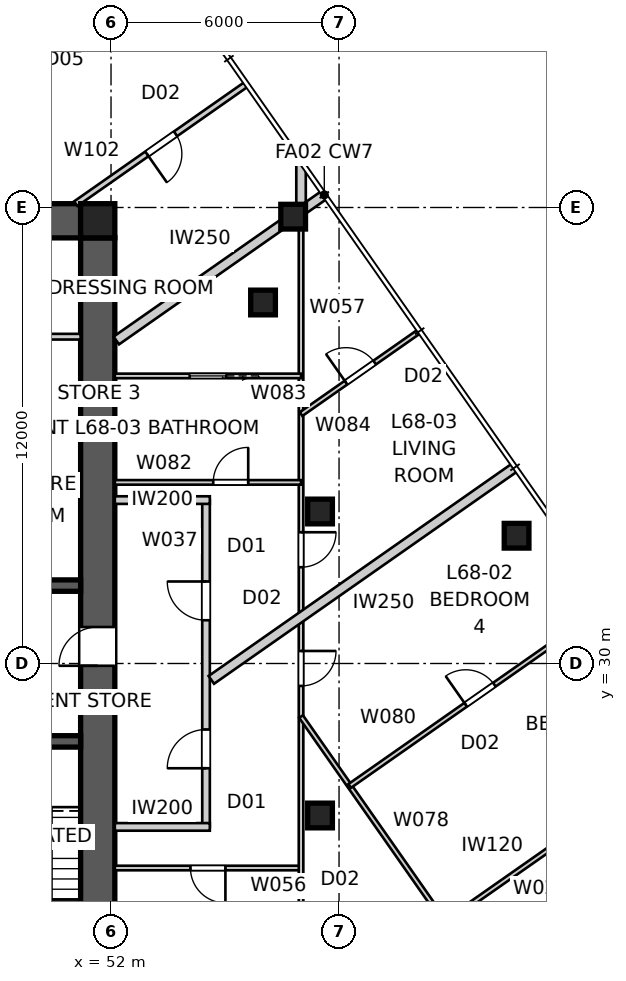
"""IFC4 building model, lengths in metres.
Left out: names, types, materials, properties, quantities, classifications, styles, units other than length and angle.
Written with IfcOpenShell. Run it as: python <this file> out.ifc"""

import sys

from ifc_helpers import new_model, si_unit, direction, frame, frame_2d, origin, origin_2d, place, context, subcontext, project, spatial, polyline, rectangle, outline, extrude, element, fill, save


model = new_model("IFC4")
c1 = context("Model", 3, precision=1e-05, world=origin(), true_north=direction((0.0, 1.0)))
c2 = subcontext(c1, "Body", "Model", "MODEL_VIEW")
j1 = project(units=[si_unit("LENGTHUNIT", "METRE"), si_unit("PLANEANGLEUNIT", "RADIAN")], contexts=[c1])
p1 = place(None, origin())
s1 = spatial("IfcSite", under=j1, at=p1, CompositionType="ELEMENT")
p2 = place(p1, origin())
s2 = spatial("IfcBuilding", under=s1, at=p2, CompositionType="ELEMENT")
p3 = place(p2, frame((0.0, 0.0, 247.2)))
s3 = spatial("IfcBuildingStorey", under=s2, at=p3, CompositionType="ELEMENT", Elevation=247.2)
p4 = place(p3, frame((28.8, 41.65, 0.0), z_axis=(0.0, 0.0, 1.0), x_axis=(1.0, 0.0, 0.0)))
e1 = element("IfcWall", 1, at=p4, inside=s3, PredefinedType="SHEAR", context=c2, shape_type="SweptSolid", body=[
    extrude(outline(polyline([(0.0, -0.45), (22.4, -0.45), (22.4, -0.025), (22.85, -0.025), (22.85, 0.025), (22.4, 0.025), (22.4, 0.45), (0.0, 0.45), (0.0, 0.025), (-0.45, 0.025), (-0.45, -0.025), (0.0, -0.025), (0.0, -0.45)])), origin(), (0.0, 0.0, 1.0), 3.4),
])
p5 = place(p3, frame((51.65, 18.8, 0.0), z_axis=(0.0, 0.0, 1.0), x_axis=(0.0, 1.0, 0.0)))
e2 = element("IfcWall", 2, at=p5, inside=s3, PredefinedType="SHEAR", context=c2, shape_type="SweptSolid", body=[
    extrude(outline(polyline([(0.0, -0.45), (22.4, -0.45), (22.4, -0.025), (22.85, -0.025), (22.85, 0.025), (22.4, 0.025), (22.4, 0.45), (0.0, 0.45), (0.0, 0.025), (-0.45, 0.025), (-0.45, -0.025), (0.0, -0.025), (0.0, -0.45)])), origin(), (0.0, 0.0, 1.0), 3.4),
])
p6 = place(p5, frame((11.14, 0.0, 0.0)))
e3 = element("IfcOpeningElement", 3, at=p6, cuts=e2, PredefinedType="OPENING", context=c2, shape_type="SweptSolid", body=[
    extrude(rectangle(XDim=1.02, YDim=2.4, at=frame_2d((0.51, 1.2))), frame((0.0, 0.46, 0.0), z_axis=(0.0, -1.0, 0.0), x_axis=(1.0, 0.0, 0.0)), (0.0, 0.0, 1.0), 0.92),
])
p7 = place(p3, frame((28.8, 32.05, 0.0), z_axis=(0.0, 0.0, 1.0), x_axis=(1.0, 0.0, 0.0)))
e4 = element("IfcWall", 4, at=p7, inside=s3, PredefinedType="SHEAR", context=c2, shape_type="SweptSolid", body=[
    extrude(rectangle(XDim=22.4, YDim=0.3, at=frame_2d((11.2, 0.0))), origin(), (0.0, 0.0, 1.0), 3.4),
])
p8 = place(p7, frame((19.04, 0.0, 0.0)))
e5 = element("IfcOpeningElement", 5, at=p8, cuts=e4, PredefinedType="OPENING", context=c2, shape_type="SweptSolid", body=[
    extrude(rectangle(XDim=0.92, YDim=2.1, at=frame_2d((0.46, 1.05))), frame((0.0, 0.16, 0.0), z_axis=(0.0, -1.0, 0.0), x_axis=(1.0, 0.0, 0.0)), (0.0, 0.0, 1.0), 0.32),
])
p9 = place(p7, frame((1.265, 0.0, 0.0)))
e6 = element("IfcOpeningElement", 6, at=p9, cuts=e4, PredefinedType="OPENING", context=c2, shape_type="SweptSolid", body=[
    extrude(rectangle(XDim=1.02, YDim=2.1, at=frame_2d((0.51, 1.05))), frame((0.0, 0.16, 0.0), z_axis=(0.0, -1.0, 0.0), x_axis=(1.0, 0.0, 0.0)), (0.0, 0.0, 1.0), 0.32),
])
p10 = place(p7, frame((4.015, 0.0, 0.0)))
e7 = element("IfcOpeningElement", 7, at=p10, cuts=e4, PredefinedType="OPENING", context=c2, shape_type="SweptSolid", body=[
    extrude(rectangle(XDim=0.92, YDim=2.1, at=frame_2d((0.46, 1.05))), frame((0.0, 0.16, 0.0), z_axis=(0.0, -1.0, 0.0), x_axis=(1.0, 0.0, 0.0)), (0.0, 0.0, 1.0), 0.32),
])
p11 = place(p7, frame((7.015, 0.0, 0.0)))
e8 = element("IfcOpeningElement", 8, at=p11, cuts=e4, PredefinedType="OPENING", context=c2, shape_type="SweptSolid", body=[
    extrude(rectangle(XDim=0.92, YDim=2.1, at=frame_2d((0.46, 1.05))), frame((0.0, 0.16, 0.0), z_axis=(0.0, -1.0, 0.0), x_axis=(1.0, 0.0, 0.0)), (0.0, 0.0, 1.0), 0.32),
])
p12 = place(p7, frame((9.34, 0.0, 0.0)))
e9 = element("IfcOpeningElement", 9, at=p12, cuts=e4, PredefinedType="OPENING", context=c2, shape_type="SweptSolid", body=[
    extrude(rectangle(XDim=0.92, YDim=2.1, at=frame_2d((0.46, 1.05))), frame((0.0, 0.16, 0.0), z_axis=(0.0, -1.0, 0.0), x_axis=(1.0, 0.0, 0.0)), (0.0, 0.0, 1.0), 0.32),
])
p13 = place(p7, frame((12.05, 0.0, 0.0)))
e10 = element("IfcOpeningElement", 10, at=p13, cuts=e4, PredefinedType="OPENING", context=c2, shape_type="SweptSolid", body=[
    extrude(rectangle(XDim=1.1, YDim=2.1, at=frame_2d((0.55, 1.05))), frame((0.0, 0.16, 0.0), z_axis=(0.0, -1.0, 0.0), x_axis=(1.0, 0.0, 0.0)), (0.0, 0.0, 1.0), 0.32),
])
p14 = place(p7, frame((14.85, 0.0, 0.0)))
e11 = element("IfcOpeningElement", 11, at=p14, cuts=e4, PredefinedType="OPENING", context=c2, shape_type="SweptSolid", body=[
    extrude(rectangle(XDim=1.1, YDim=2.1, at=frame_2d((0.55, 1.05))), frame((0.0, 0.16, 0.0), z_axis=(0.0, -1.0, 0.0), x_axis=(1.0, 0.0, 0.0)), (0.0, 0.0, 1.0), 0.32),
])
p15 = place(p3, frame((51.2, 27.95, 0.0), z_axis=(0.0, 0.0, 1.0), x_axis=(-1.0, 0.0, 0.0)))
e12 = element("IfcWall", 12, at=p15, inside=s3, PredefinedType="SHEAR", context=c2, shape_type="SweptSolid", body=[
    extrude(rectangle(XDim=22.4, YDim=0.3, at=frame_2d((11.2, 0.0))), origin(), (0.0, 0.0, 1.0), 3.4),
])
p16 = place(p15, frame((19.04, 0.0, 0.0)))
e13 = element("IfcOpeningElement", 13, at=p16, cuts=e12, PredefinedType="OPENING", context=c2, shape_type="SweptSolid", body=[
    extrude(rectangle(XDim=0.92, YDim=2.1, at=frame_2d((0.46, 1.05))), frame((0.0, 0.16, 0.0), z_axis=(0.0, -1.0, 0.0), x_axis=(1.0, 0.0, 0.0)), (0.0, 0.0, 1.0), 0.32),
])
p17 = place(p15, frame((1.265, 0.0, 0.0)))
e14 = element("IfcOpeningElement", 14, at=p17, cuts=e12, PredefinedType="OPENING", context=c2, shape_type="SweptSolid", body=[
    extrude(rectangle(XDim=1.02, YDim=2.1, at=frame_2d((0.51, 1.05))), frame((0.0, 0.16, 0.0), z_axis=(0.0, -1.0, 0.0), x_axis=(1.0, 0.0, 0.0)), (0.0, 0.0, 1.0), 0.32),
])
p18 = place(p15, frame((4.015, 0.0, 0.0)))
e15 = element("IfcOpeningElement", 15, at=p18, cuts=e12, PredefinedType="OPENING", context=c2, shape_type="SweptSolid", body=[
    extrude(rectangle(XDim=0.92, YDim=2.1, at=frame_2d((0.46, 1.05))), frame((0.0, 0.16, 0.0), z_axis=(0.0, -1.0, 0.0), x_axis=(1.0, 0.0, 0.0)), (0.0, 0.0, 1.0), 0.32),
])
p19 = place(p15, frame((9.79, 0.0, 0.0)))
e16 = element("IfcOpeningElement", 16, at=p19, cuts=e12, PredefinedType="OPENING", context=c2, shape_type="SweptSolid", body=[
    extrude(rectangle(XDim=0.92, YDim=2.1, at=frame_2d((0.46, 1.05))), frame((0.0, 0.16, 0.0), z_axis=(0.0, -1.0, 0.0), x_axis=(1.0, 0.0, 0.0)), (0.0, 0.0, 1.0), 0.32),
])
p20 = place(p15, frame((6.115, 0.0, 0.0)))
e17 = element("IfcOpeningElement", 17, at=p20, cuts=e12, PredefinedType="OPENING", context=c2, shape_type="SweptSolid", body=[
    extrude(rectangle(XDim=0.92, YDim=2.1, at=frame_2d((0.46, 1.05))), frame((0.0, 0.16, 0.0), z_axis=(0.0, -1.0, 0.0), x_axis=(1.0, 0.0, 0.0)), (0.0, 0.0, 1.0), 0.32),
])
p21 = place(p15, frame((12.05, 0.0, 0.0)))
e18 = element("IfcOpeningElement", 18, at=p21, cuts=e12, PredefinedType="OPENING", context=c2, shape_type="SweptSolid", body=[
    extrude(rectangle(XDim=1.1, YDim=2.1, at=frame_2d((0.55, 1.05))), frame((0.0, 0.16, 0.0), z_axis=(0.0, -1.0, 0.0), x_axis=(1.0, 0.0, 0.0)), (0.0, 0.0, 1.0), 0.32),
])
p22 = place(p15, frame((14.85, 0.0, 0.0)))
e19 = element("IfcOpeningElement", 19, at=p22, cuts=e12, PredefinedType="OPENING", context=c2, shape_type="SweptSolid", body=[
    extrude(rectangle(XDim=1.1, YDim=2.1, at=frame_2d((0.55, 1.05))), frame((0.0, 0.16, 0.0), z_axis=(0.0, -1.0, 0.0), x_axis=(1.0, 0.0, 0.0)), (0.0, 0.0, 1.0), 0.32),
])
p23 = place(p3, frame((51.65, 41.65, 0.0), z_axis=(0.0, 0.0, 1.0), x_axis=(1.0, 0.0, 0.0)))
e20 = element("IfcColumn", 20, at=p23, inside=s3, PredefinedType="COLUMN", context=c2, shape_type="SweptSolid", body=[
    extrude(rectangle(XDim=0.9, YDim=0.9, at=origin_2d()), origin(), (0.0, 0.0, 1.0), 3.4),
])
for number, where, z_axis, x_axis in (
    (21, (62.672, 33.362, 0.0), (0.0, 0.0, 1.0), (1.0, 0.0, 0.0)),
    (22, (56.793, 41.758, 0.0), (0.0, 0.0, 1.0), (1.0, 0.0, 0.0)),
    (23, (57.5, 26.0, 0.0), (0.0, 0.0, 1.0), (1.0, 0.0, 0.0)),
    (24, (57.5, 34.0, 0.0), (0.0, 0.0, 1.0), (1.0, 0.0, 0.0)),
    (25, (56.0, 39.5, 0.0), (0.0, 0.0, 1.0), (1.0, 0.0, 0.0)),
):
    element("IfcColumn", number, at=place(p3, frame(where, z_axis=z_axis, x_axis=x_axis)), inside=s3, PredefinedType="COLUMN", context=c2, shape_type="SweptSolid", body=[
        extrude(rectangle(XDim=0.65, YDim=0.65, at=origin_2d()), origin(), (0.0, 0.0, 1.0), 3.4),
    ])
p24 = place(p3, frame((54.5, 25.7, 0.0), z_axis=(0.0, 0.0, 1.0), x_axis=(0.0, 1.0, 0.0)))
e26 = element("IfcWall", 26, at=p24, inside=s3, PredefinedType="PARTITIONING", context=c2, shape_type="SweptSolid", body=[
    extrude(rectangle(XDim=8.6, YDim=0.2, at=frame_2d((4.3, 0.0))), origin(), (0.0, 0.0, 1.0), 3.25),
])
p25 = place(p24, frame((5.438, 0.0, 0.0)))
e27 = element("IfcOpeningElement", 27, at=p25, cuts=e26, PredefinedType="OPENING", context=c2, shape_type="SweptSolid", body=[
    extrude(rectangle(XDim=1.02, YDim=2.34, at=frame_2d((0.51, 1.17))), frame((0.0, 0.11, 0.0), z_axis=(0.0, -1.0, 0.0), x_axis=(1.0, 0.0, 0.0)), (0.0, 0.0, 1.0), 0.22),
])
p26 = place(p24, frame((1.543, 0.0, 0.0)))
e28 = element("IfcOpeningElement", 28, at=p26, cuts=e26, PredefinedType="OPENING", context=c2, shape_type="SweptSolid", body=[
    extrude(rectangle(XDim=1.02, YDim=2.34, at=frame_2d((0.51, 1.17))), frame((0.0, 0.11, 0.0), z_axis=(0.0, -1.0, 0.0), x_axis=(1.0, 0.0, 0.0)), (0.0, 0.0, 1.0), 0.22),
])
for number, where, z_axis, x_axis in (
    (29, (52.1, 34.3, 0.0), (0.0, 0.0, 1.0), (1.0, 0.0, 0.0)),
    (30, (52.1, 25.7, 0.0), (0.0, 0.0, 1.0), (1.0, 0.0, 0.0)),
):
    element("IfcWall", number, at=place(p3, frame(where, z_axis=z_axis, x_axis=x_axis)), inside=s3, PredefinedType="PARTITIONING", context=c2, shape_type="SweptSolid", body=[
        extrude(rectangle(XDim=2.5, YDim=0.2, at=frame_2d((1.25, 0.0))), origin(), (0.0, 0.0, 1.0), 3.25),
    ])
p27 = place(p3, frame((57.612, 42.332, 0.0), z_axis=(0.0, 0.0, 1.0), x_axis=(-0.819161528122, -0.573562891796, 0.0)))
e31 = element("IfcWall", 31, at=p27, inside=s3, PredefinedType="PARTITIONING", context=c2, shape_type="SweptSolid", body=[
    extrude(rectangle(XDim=6.681, YDim=0.25, at=frame_2d((3.341, 0.0))), origin(), (0.0, 0.0, 1.0), 3.25),
])
p28 = place(p3, frame((62.631, 35.164, 0.0), z_axis=(0.0, 0.0, 1.0), x_axis=(-0.81915902312, -0.573566469418, 0.0)))
e32 = element("IfcWall", 32, at=p28, inside=s3, PredefinedType="PARTITIONING", context=c2, shape_type="SweptSolid", body=[
    extrude(rectangle(XDim=9.756, YDim=0.25, at=frame_2d((4.878, 0.0))), origin(), (0.0, 0.0, 1.0), 3.25),
])
p29 = place(p3, frame((47.6, 38.6, 0.0), z_axis=(0.0, 0.0, 1.0), x_axis=(1.0, 0.0, 0.0)))
e33 = element("IfcWall", 33, at=p29, inside=s3, PredefinedType="SOLIDWALL", context=c2, shape_type="SweptSolid", body=[
    extrude(rectangle(XDim=3.6, YDim=0.15, at=frame_2d((1.8, 0.0))), origin(), (0.0, 0.0, 1.0), 3.25),
])
p30 = place(p29, frame((1.34, 0.0, 0.0)))
e34 = element("IfcOpeningElement", 34, at=p30, cuts=e33, PredefinedType="OPENING", context=c2, shape_type="SweptSolid", body=[
    extrude(rectangle(XDim=0.92, YDim=2.1, at=frame_2d((0.46, 1.05))), frame((0.0, 0.085, 0.0), z_axis=(0.0, -1.0, 0.0), x_axis=(1.0, 0.0, 0.0)), (0.0, 0.0, 1.0), 0.17),
])
p31 = place(p3, frame((57.0, 24.618, 0.0), z_axis=(0.0, 0.0, 1.0), x_axis=(-1.0, 0.0, 0.0)))
e35 = element("IfcWall", 35, at=p31, inside=s3, PredefinedType="PARTITIONING", context=c2, shape_type="SweptSolid", body=[
    extrude(rectangle(XDim=4.9, YDim=0.12, at=frame_2d((2.45, 0.0))), origin(), (0.0, 0.0, 1.0), 3.25),
])
p32 = place(p31, frame((1.99, 0.0, 0.0)))
e36 = element("IfcOpeningElement", 36, at=p32, cuts=e35, PredefinedType="OPENING", context=c2, shape_type="SweptSolid", body=[
    extrude(rectangle(XDim=0.92, YDim=2.34, at=frame_2d((0.46, 1.17))), frame((0.0, 0.07, 0.0), z_axis=(0.0, -1.0, 0.0), x_axis=(1.0, 0.0, 0.0)), (0.0, 0.0, 1.0), 0.14),
])
p33 = place(p3, frame((57.0, 41.904, 0.0), z_axis=(0.0, 0.0, 1.0), x_axis=(0.0, -1.0, 0.0)))
e37 = element("IfcWall", 37, at=p33, inside=s3, PredefinedType="PARTITIONING", context=c2, shape_type="SweptSolid", body=[
    extrude(rectangle(XDim=20.498, YDim=0.12, at=frame_2d((10.249, 0.0))), origin(), (0.0, 0.0, 1.0), 2.55),
])
p34 = place(p33, frame((8.449, 0.0, 0.0)))
e38 = element("IfcOpeningElement", 38, at=p34, cuts=e37, PredefinedType="OPENING", context=c2, shape_type="SweptSolid", body=[
    extrude(rectangle(XDim=0.92, YDim=2.34, at=frame_2d((0.46, 1.17))), frame((0.0, 0.07, 0.0), z_axis=(0.0, -1.0, 0.0), x_axis=(1.0, 0.0, 0.0)), (0.0, 0.0, 1.0), 0.14),
])
p35 = place(p33, frame((11.574, 0.0, 0.0)))
e39 = element("IfcOpeningElement", 39, at=p35, cuts=e37, PredefinedType="OPENING", context=c2, shape_type="SweptSolid", body=[
    extrude(rectangle(XDim=0.92, YDim=2.34, at=frame_2d((0.46, 1.17))), frame((0.0, 0.07, 0.0), z_axis=(0.0, -1.0, 0.0), x_axis=(1.0, 0.0, 0.0)), (0.0, 0.0, 1.0), 0.14),
])
p36 = place(p33, frame((18.432, 0.0, 0.0)))
e40 = element("IfcOpeningElement", 40, at=p36, cuts=e37, PredefinedType="OPENING", context=c2, shape_type="SweptSolid", body=[
    extrude(rectangle(XDim=0.92, YDim=2.34, at=frame_2d((0.46, 1.17))), frame((0.0, 0.07, 0.0), z_axis=(0.0, -1.0, 0.0), x_axis=(1.0, 0.0, 0.0)), (0.0, 0.0, 1.0), 0.14),
])
p37 = place(p3, frame((57.0, 28.604, 0.0), z_axis=(0.0, 0.0, 1.0), x_axis=(0.573575545802, -0.819152667857, 0.0)))
e41 = element("IfcWall", 41, at=p37, inside=s3, PredefinedType="PARTITIONING", context=c2, shape_type="SweptSolid", body=[
    extrude(rectangle(XDim=10.566, YDim=0.12, at=frame_2d((5.283, 0.0))), origin(), (0.0, 0.0, 1.0), 3.25),
])
p38 = place(p37, frame((8.121, 0.0, 0.0)))
e42 = element("IfcOpeningElement", 42, at=p38, cuts=e41, PredefinedType="OPENING", context=c2, shape_type="SweptSolid", body=[
    extrude(rectangle(XDim=0.92, YDim=2.34, at=frame_2d((0.46, 1.17))), frame((0.0, 0.07, 0.0), z_axis=(0.0, -1.0, 0.0), x_axis=(1.0, 0.0, 0.0)), (0.0, 0.0, 1.0), 0.14),
])
p39 = place(p3, frame((58.28, 26.777, 0.0), z_axis=(0.0, 0.0, 1.0), x_axis=(0.819152099525, 0.573576357466, 0.0)))
e43 = element("IfcWall", 43, at=p39, inside=s3, PredefinedType="PARTITIONING", context=c2, shape_type="SweptSolid", body=[
    extrude(rectangle(XDim=8.335, YDim=0.12, at=frame_2d((4.167, 0.0))), origin(), (0.0, 0.0, 1.0), 3.25),
])
p40 = place(p39, frame((3.728, 0.0, 0.0)))
e44 = element("IfcOpeningElement", 44, at=p40, cuts=e43, PredefinedType="OPENING", context=c2, shape_type="SweptSolid", body=[
    extrude(rectangle(XDim=0.92, YDim=2.34, at=frame_2d((0.46, 1.17))), frame((0.0, 0.07, 0.0), z_axis=(0.0, -1.0, 0.0), x_axis=(1.0, 0.0, 0.0)), (0.0, 0.0, 1.0), 0.14),
])
p41 = place(p3, frame((64.34, 25.679, 0.0), z_axis=(0.0, 0.0, 1.0), x_axis=(-0.819165768115, -0.573556836197, 0.0)))
e45 = element("IfcWall", 45, at=p41, inside=s3, PredefinedType="PARTITIONING", context=c2, shape_type="SweptSolid", body=[
    extrude(rectangle(XDim=4.335, YDim=0.12, at=frame_2d((2.167, 0.0))), origin(), (0.0, 0.0, 1.0), 3.25),
])
p42 = place(p3, frame((52.1, 34.766, 0.0), z_axis=(0.0, 0.0, 1.0), x_axis=(1.0, 0.0, 0.0)))
e46 = element("IfcWall", 46, at=p42, inside=s3, PredefinedType="PARTITIONING", context=c2, shape_type="SweptSolid", body=[
    extrude(rectangle(XDim=4.9, YDim=0.12, at=frame_2d((2.45, 0.0))), origin(), (0.0, 0.0, 1.0), 3.25),
])
p43 = place(p42, frame((2.59, 0.0, 0.0)))
e47 = element("IfcOpeningElement", 47, at=p43, cuts=e46, PredefinedType="OPENING", context=c2, shape_type="SweptSolid", body=[
    extrude(rectangle(XDim=0.92, YDim=2.34, at=frame_2d((0.46, 1.17))), frame((0.0, 0.07, 0.0), z_axis=(0.0, -1.0, 0.0), x_axis=(1.0, 0.0, 0.0)), (0.0, 0.0, 1.0), 0.14),
])
p44 = place(p3, frame((57.0, 37.568, 0.0), z_axis=(0.0, 0.0, 1.0), x_axis=(-1.0, 0.0, 0.0)))
e48 = element("IfcWall", 48, at=p44, inside=s3, PredefinedType="PARTITIONING", context=c2, shape_type="SweptSolid", body=[
    extrude(rectangle(XDim=4.9, YDim=0.12, at=frame_2d((2.45, 0.0))), origin(), (0.0, 0.0, 1.0), 3.25),
])
p45 = place(p44, frame((1.97, 0.0, 0.0)))
e49 = element("IfcOpeningElement", 49, at=p45, cuts=e48, PredefinedType="OPENING", context=c2, shape_type="SweptSolid", body=[
    extrude(rectangle(XDim=0.96, YDim=2.1, at=frame_2d((0.48, 1.05))), frame((0.0, 0.07, 0.0), z_axis=(0.0, -1.0, 0.0), x_axis=(1.0, 0.0, 0.0)), (0.0, 0.0, 1.0), 0.14),
])
p46 = place(p3, frame((57.0, 36.562, 0.0), z_axis=(0.0, 0.0, 1.0), x_axis=(0.819140645834, 0.573592714688, 0.0)))
e50 = element("IfcWall", 50, at=p46, inside=s3, PredefinedType="PARTITIONING", context=c2, shape_type="SweptSolid", body=[
    extrude(rectangle(XDim=3.77, YDim=0.12, at=frame_2d((1.885, 0.0))), origin(), (0.0, 0.0, 1.0), 3.25),
])
p47 = place(p46, frame((1.445, 0.0, 0.0)))
e51 = element("IfcOpeningElement", 51, at=p47, cuts=e50, PredefinedType="OPENING", context=c2, shape_type="SweptSolid", body=[
    extrude(rectangle(XDim=0.92, YDim=2.34, at=frame_2d((0.46, 1.17))), frame((0.0, 0.07, 0.0), z_axis=(0.0, -1.0, 0.0), x_axis=(1.0, 0.0, 0.0)), (0.0, 0.0, 1.0), 0.14),
])
p48 = place(p3, frame((57.0, 41.919, 0.0), z_axis=(0.0, 0.0, 1.0), x_axis=(0.0, 1.0, 0.0)))
e52 = element("IfcWall", 52, at=p48, inside=s3, PredefinedType="PARTITIONING", context=c2, shape_type="SweptSolid", body=[
    extrude(rectangle(XDim=1.217, YDim=0.25, at=frame_2d((0.608, 0.0))), origin(), (0.0, 0.0, 1.0), 3.25),
])
p49 = place(p3, frame((55.537, 45.226, 0.0), z_axis=(0.0, 0.0, 1.0), x_axis=(-0.819158250207, -0.573567573279, 0.0)))
e53 = element("IfcWall", 53, at=p49, inside=s3, PredefinedType="SOLIDWALL", context=c2, shape_type="SweptSolid", body=[
    extrude(rectangle(XDim=5.45, YDim=0.15, at=frame_2d((2.725, 0.0))), origin(), (0.0, 0.0, 1.0), 3.25),
])
p50 = place(p49, frame((2.245, 0.0, 0.0)))
e54 = element("IfcOpeningElement", 54, at=p50, cuts=e53, PredefinedType="OPENING", context=c2, shape_type="SweptSolid", body=[
    extrude(rectangle(XDim=0.92, YDim=2.34, at=frame_2d((0.46, 1.17))), frame((0.0, 0.085, 0.0), z_axis=(0.0, -1.0, 0.0), x_axis=(1.0, 0.0, 0.0)), (0.0, 0.0, 1.0), 0.17),
])
p51 = place(p25, origin())
e55 = element("IfcDoor", 55, at=p51, inside=s3, OperationType="SINGLE_SWING_RIGHT", PredefinedType="DOOR", context=c2, shape_type="SweptSolid", body=[
    extrude(rectangle(XDim=1.02, YDim=2.34, at=frame_2d((0.51, 1.17))), frame((0.0, 0.025, 0.0), z_axis=(0.0, -1.0, 0.0), x_axis=(1.0, 0.0, 0.0)), (0.0, 0.0, 1.0), 0.05),
])
fill(e27, e55)
p52 = place(p26, origin())
e56 = element("IfcDoor", 56, at=p52, inside=s3, OperationType="SINGLE_SWING_LEFT", PredefinedType="DOOR", context=c2, shape_type="SweptSolid", body=[
    extrude(rectangle(XDim=1.02, YDim=2.34, at=frame_2d((0.51, 1.17))), frame((0.0, 0.025, 0.0), z_axis=(0.0, -1.0, 0.0), x_axis=(1.0, 0.0, 0.0)), (0.0, 0.0, 1.0), 0.05),
])
fill(e28, e56)
p53 = place(p43, origin())
e57 = element("IfcDoor", 57, at=p53, inside=s3, OperationType="SINGLE_SWING_RIGHT", PredefinedType="DOOR", context=c2, shape_type="SweptSolid", body=[
    extrude(rectangle(XDim=0.92, YDim=2.34, at=frame_2d((0.46, 1.17))), frame((0.0, 0.025, 0.0), z_axis=(0.0, -1.0, 0.0), x_axis=(1.0, 0.0, 0.0)), (0.0, 0.0, 1.0), 0.05),
])
fill(e47, e57)
p54 = place(p34, origin())
e58 = element("IfcDoor", 58, at=p54, inside=s3, OperationType="SINGLE_SWING_LEFT", PredefinedType="DOOR", context=c2, shape_type="SweptSolid", body=[
    extrude(rectangle(XDim=0.92, YDim=2.34, at=frame_2d((0.46, 1.17))), frame((0.0, 0.025, 0.0), z_axis=(0.0, -1.0, 0.0), x_axis=(1.0, 0.0, 0.0)), (0.0, 0.0, 1.0), 0.05),
])
fill(e38, e58)
p55 = place(p32, origin())
e59 = element("IfcDoor", 59, at=p55, inside=s3, OperationType="SINGLE_SWING_LEFT", PredefinedType="DOOR", context=c2, shape_type="SweptSolid", body=[
    extrude(rectangle(XDim=0.92, YDim=2.34, at=frame_2d((0.46, 1.17))), frame((0.0, 0.025, 0.0), z_axis=(0.0, -1.0, 0.0), x_axis=(1.0, 0.0, 0.0)), (0.0, 0.0, 1.0), 0.05),
])
fill(e36, e59)
p56 = place(p35, origin())
e60 = element("IfcDoor", 60, at=p56, inside=s3, OperationType="SINGLE_SWING_LEFT", PredefinedType="DOOR", context=c2, shape_type="SweptSolid", body=[
    extrude(rectangle(XDim=0.92, YDim=2.34, at=frame_2d((0.46, 1.17))), frame((0.0, 0.025, 0.0), z_axis=(0.0, -1.0, 0.0), x_axis=(1.0, 0.0, 0.0)), (0.0, 0.0, 1.0), 0.05),
])
fill(e39, e60)
p57 = place(p45, origin())
e61 = element("IfcDoor", 61, at=p57, inside=s3, OperationType="SLIDING_TO_LEFT", PredefinedType="DOOR", context=c2, shape_type="SweptSolid", body=[
    extrude(rectangle(XDim=0.96, YDim=2.1, at=frame_2d((0.48, 1.05))), frame((0.0, 0.025, 0.0), z_axis=(0.0, -1.0, 0.0), x_axis=(1.0, 0.0, 0.0)), (0.0, 0.0, 1.0), 0.05),
])
fill(e49, e61)
p58 = place(p47, origin())
e62 = element("IfcDoor", 62, at=p58, inside=s3, OperationType="SINGLE_SWING_LEFT", PredefinedType="DOOR", context=c2, shape_type="SweptSolid", body=[
    extrude(rectangle(XDim=0.92, YDim=2.34, at=frame_2d((0.46, 1.17))), frame((0.0, 0.025, 0.0), z_axis=(0.0, -1.0, 0.0), x_axis=(1.0, 0.0, 0.0)), (0.0, 0.0, 1.0), 0.05),
])
fill(e51, e62)
p59 = place(p50, origin())
e63 = element("IfcDoor", 63, at=p59, inside=s3, OperationType="SINGLE_SWING_RIGHT", PredefinedType="DOOR", context=c2, shape_type="SweptSolid", body=[
    extrude(rectangle(XDim=0.92, YDim=2.34, at=frame_2d((0.46, 1.17))), frame((0.0, 0.025, 0.0), z_axis=(0.0, -1.0, 0.0), x_axis=(1.0, 0.0, 0.0)), (0.0, 0.0, 1.0), 0.05),
])
fill(e54, e63)
p60 = place(p40, origin())
e64 = element("IfcDoor", 64, at=p60, inside=s3, OperationType="SINGLE_SWING_LEFT", PredefinedType="DOOR", context=c2, shape_type="SweptSolid", body=[
    extrude(rectangle(XDim=0.92, YDim=2.34, at=frame_2d((0.46, 1.17))), frame((0.0, 0.025, 0.0), z_axis=(0.0, -1.0, 0.0), x_axis=(1.0, 0.0, 0.0)), (0.0, 0.0, 1.0), 0.05),
])
fill(e44, e64)
p61 = place(p6, origin())
e65 = element("IfcDoor", 65, at=p61, inside=s3, OperationType="SINGLE_SWING_LEFT", PredefinedType="DOOR", context=c2, shape_type="SweptSolid", body=[
    extrude(rectangle(XDim=1.02, YDim=2.4, at=frame_2d((0.51, 1.2))), frame((0.0, 0.025, 0.0), z_axis=(0.0, -1.0, 0.0), x_axis=(1.0, 0.0, 0.0)), (0.0, 0.0, 1.0), 0.05),
])
fill(e3, e65)
save(model, sys.argv[1])
